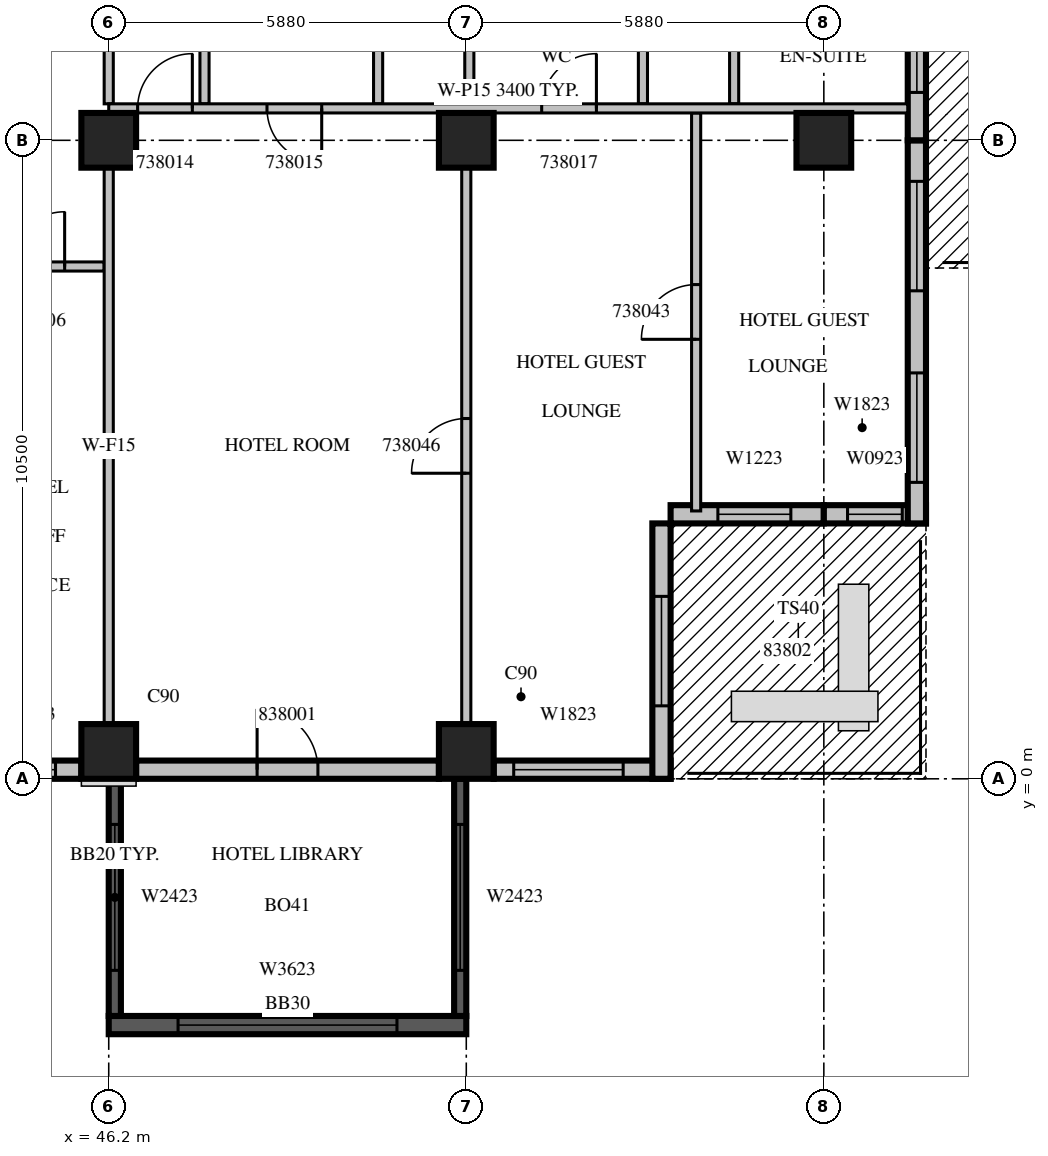
"""IFC4 building model, lengths in metres.
Left out: names, types, materials, properties, quantities, classifications, styles, units other than length and angle.
Written with IfcOpenShell. Run it as: python <this file> out.ifc"""

import sys

from ifc_helpers import new_model, si_unit, direction, frame, frame_2d, origin, origin_2d, place, context, subcontext, project, spatial, rectangle, extrude, source, transform, mapped, element, fill, save


model = new_model("IFC4")
c1 = context("Model", 3, precision=1e-05, world=origin(), true_north=direction((0.0, 1.0)))
c2 = subcontext(c1, "Body", "Model", "MODEL_VIEW")
j1 = project(units=[si_unit("LENGTHUNIT", "METRE"), si_unit("PLANEANGLEUNIT", "RADIAN")], contexts=[c1])
p1 = place(None, origin())
s1 = spatial("IfcSite", under=j1, at=p1, CompositionType="ELEMENT")
p2 = place(p1, origin())
s2 = spatial("IfcBuilding", under=s1, at=p2, CompositionType="ELEMENT")
p3 = place(p2, frame((0.0, 0.0, 177.8)))
s3 = spatial("IfcBuildingStorey", under=s2, at=p3, CompositionType="ELEMENT", Elevation=177.8)
m1 = source(origin(), c2, "Body", "SweptSolid", [
    extrude(rectangle(XDim=0.9, YDim=0.9, at=origin_2d()), origin(), (0.0, 0.0, 1.0), 3.8),
])
for number, where, z_axis, x_axis in (
    (1, (46.2, 0.45, 0.0), (0.0, 0.0, 1.0), (1.0, 0.0, 0.0)),
    (2, (52.08, 0.45, 0.0), (0.0, 0.0, 1.0), (1.0, 0.0, 0.0)),
    (3, (46.2, 10.5, 0.0), (0.0, 0.0, 1.0), (1.0, 0.0, 0.0)),
    (4, (52.08, 10.5, 0.0), (0.0, 0.0, 1.0), (1.0, 0.0, 0.0)),
    (5, (57.96, 10.5, 0.0), (0.0, 0.0, 1.0), (1.0, 0.0, 0.0)),
):
    element("IfcColumn", number, at=place(p3, frame(where, z_axis=z_axis, x_axis=x_axis)), inside=s3, PredefinedType="COLUMN", context=c2, shape_type="MappedRepresentation", body=[
        mapped(m1, transform((0.0, 0.0, 0.0), scale=1.0)),
    ])
p4 = place(p3, frame((44.0, 0.15, 0.0), z_axis=(0.0, 0.0, 1.0), x_axis=(1.0, 0.0, 0.0)))
e6 = element("IfcWall", 6, at=p4, inside=s3, PredefinedType="STANDARD", context=c2, shape_type="SweptSolid", body=[
    extrude(rectangle(XDim=1.75, YDim=0.3, at=frame_2d((0.875, 0.0))), origin(), (0.0, 0.0, 1.0), 3.4),
])
p5 = place(p4, frame((0.425, 0.0, 0.6)))
e7 = element("IfcOpeningElement", 7, at=p5, cuts=e6, PredefinedType="OPENING", context=c2, shape_type="SweptSolid", body=[
    extrude(rectangle(XDim=0.9, YDim=2.3, at=frame_2d((0.45, 1.15))), frame((0.0, 0.16, 0.0), z_axis=(0.0, -1.0, 0.0), x_axis=(1.0, 0.0, 0.0)), (0.0, 0.0, 1.0), 0.32),
])
p6 = place(p3, frame((46.65, 0.15, 0.0), z_axis=(0.0, 0.0, 1.0), x_axis=(1.0, 0.0, 0.0)))
e8 = element("IfcWall", 8, at=p6, inside=s3, PredefinedType="STANDARD", context=c2, shape_type="SweptSolid", body=[
    extrude(rectangle(XDim=4.98, YDim=0.3, at=frame_2d((2.49, 0.0))), origin(), (0.0, 0.0, 1.0), 3.4),
])
m2 = source(origin(), c2, "Body", "SweptSolid", [
    extrude(rectangle(XDim=1.0, YDim=2.1, at=frame_2d((0.5, 1.05))), frame((0.0, 0.16, 0.0), z_axis=(0.0, -1.0, 0.0), x_axis=(1.0, 0.0, 0.0)), (0.0, 0.0, 1.0), 0.32),
])
p7 = place(p6, frame((1.99, 0.0, 0.0)))
e9 = element("IfcOpeningElement", 9, at=p7, cuts=e8, PredefinedType="OPENING", context=c2, shape_type="MappedRepresentation", body=[
    mapped(m2, transform((0.0, 0.0, 0.0), scale=1.0)),
])
p8 = place(p3, frame((52.53, 0.15, 0.0), z_axis=(0.0, 0.0, 1.0), x_axis=(1.0, 0.0, 0.0)))
e10 = element("IfcWall", 10, at=p8, inside=s3, PredefinedType="STANDARD", context=c2, shape_type="SweptSolid", body=[
    extrude(rectangle(XDim=2.91, YDim=0.3, at=frame_2d((1.455, 0.0))), origin(), (0.0, 0.0, 1.0), 3.4),
])
m3 = source(origin(), c2, "Body", "SweptSolid", [
    extrude(rectangle(XDim=1.8, YDim=2.3, at=frame_2d((0.9, 1.15))), frame((0.0, 0.16, 0.0), z_axis=(0.0, -1.0, 0.0), x_axis=(1.0, 0.0, 0.0)), (0.0, 0.0, 1.0), 0.32),
])
p9 = place(p8, frame((0.33, 0.0, 0.6)))
e11 = element("IfcOpeningElement", 11, at=p9, cuts=e10, PredefinedType="OPENING", context=c2, shape_type="MappedRepresentation", body=[
    mapped(m3, transform((0.0, 0.0, 0.0), scale=1.0)),
])
p10 = place(p3, frame((55.29, 0.0, 0.0), z_axis=(0.0, 0.0, 1.0), x_axis=(0.0, 1.0, 0.0)))
e12 = element("IfcWall", 12, at=p10, inside=s3, PredefinedType="STANDARD", context=c2, shape_type="SweptSolid", body=[
    extrude(rectangle(XDim=4.2, YDim=0.3, at=frame_2d((2.1, 0.0))), origin(), (0.0, 0.0, 1.0), 3.4),
])
m4 = source(origin(), c2, "Body", "SweptSolid", [
    extrude(rectangle(XDim=1.8, YDim=2.4, at=frame_2d((0.9, 1.2))), frame((0.0, 0.16, 0.0), z_axis=(0.0, -1.0, 0.0), x_axis=(1.0, 0.0, 0.0)), (0.0, 0.0, 1.0), 0.32),
])
p11 = place(p10, frame((1.2, 0.0, 0.0)))
e13 = element("IfcOpeningElement", 13, at=p11, cuts=e12, PredefinedType="OPENING", context=c2, shape_type="MappedRepresentation", body=[
    mapped(m4, transform((0.0, 0.0, 0.0), scale=1.0)),
])
p12 = place(p3, frame((55.44, 4.35, 0.0), z_axis=(0.0, 0.0, 1.0), x_axis=(1.0, 0.0, 0.0)))
e14 = element("IfcWall", 14, at=p12, inside=s3, PredefinedType="STANDARD", context=c2, shape_type="SweptSolid", body=[
    extrude(rectangle(XDim=2.52, YDim=0.3, at=frame_2d((1.26, 0.0))), origin(), (0.0, 0.0, 1.0), 3.4),
])
m5 = source(origin(), c2, "Body", "SweptSolid", [
    extrude(rectangle(XDim=1.2, YDim=2.3, at=frame_2d((0.6, 1.15))), frame((0.0, 0.16, 0.0), z_axis=(0.0, -1.0, 0.0), x_axis=(1.0, 0.0, 0.0)), (0.0, 0.0, 1.0), 0.32),
])
p13 = place(p12, frame((0.777, 0.0, 0.6)))
e15 = element("IfcOpeningElement", 15, at=p13, cuts=e14, PredefinedType="OPENING", context=c2, shape_type="MappedRepresentation", body=[
    mapped(m5, transform((0.0, 0.0, 0.0), scale=1.0)),
])
p14 = place(p3, frame((57.96, 4.35, 0.0), z_axis=(0.0, 0.0, 1.0), x_axis=(1.0, 0.0, 0.0)))
e16 = element("IfcWall", 16, at=p14, inside=s3, PredefinedType="STANDARD", context=c2, shape_type="SweptSolid", body=[
    extrude(rectangle(XDim=1.68, YDim=0.3, at=frame_2d((0.84, 0.0))), origin(), (0.0, 0.0, 1.0), 3.4),
])
m6 = source(origin(), c2, "Body", "SweptSolid", [
    extrude(rectangle(XDim=0.9, YDim=2.3, at=frame_2d((0.45, 1.15))), frame((0.0, 0.16, 0.0), z_axis=(0.0, -1.0, 0.0), x_axis=(1.0, 0.0, 0.0)), (0.0, 0.0, 1.0), 0.32),
])
p15 = place(p14, frame((0.39, 0.0, 0.6)))
e17 = element("IfcOpeningElement", 17, at=p15, cuts=e16, PredefinedType="OPENING", context=c2, shape_type="MappedRepresentation", body=[
    mapped(m6, transform((0.0, 0.0, 0.0), scale=1.0)),
])
p16 = place(p3, frame((59.49, 4.2, 0.0), z_axis=(0.0, 0.0, 1.0), x_axis=(0.0, 1.0, 0.0)))
e18 = element("IfcWall", 18, at=p16, inside=s3, PredefinedType="STANDARD", context=c2, shape_type="SweptSolid", body=[
    extrude(rectangle(XDim=6.3, YDim=0.3, at=frame_2d((3.15, 0.0))), origin(), (0.0, 0.0, 1.0), 3.4),
])
p17 = place(p16, frame((0.675, 0.0, 0.6)))
e19 = element("IfcOpeningElement", 19, at=p17, cuts=e18, PredefinedType="OPENING", context=c2, shape_type="MappedRepresentation", body=[
    mapped(m3, transform((0.0, 0.0, 0.0), scale=1.0)),
])
p18 = place(p16, frame((3.825, 0.0, 0.0)))
e20 = element("IfcOpeningElement", 20, at=p18, cuts=e18, PredefinedType="OPENING", context=c2, shape_type="MappedRepresentation", body=[
    mapped(m4, transform((0.0, 0.0, 0.0), scale=1.0)),
])
p19 = place(p3, frame((59.49, 10.5, 0.0), z_axis=(0.0, 0.0, 1.0), x_axis=(0.0, 1.0, 0.0)))
e21 = element("IfcWall", 21, at=p19, inside=s3, PredefinedType="STANDARD", context=c2, shape_type="SweptSolid", body=[
    extrude(rectangle(XDim=6.75, YDim=0.3, at=frame_2d((3.375, 0.0))), origin(), (0.0, 0.0, 1.0), 3.4),
])
p20 = place(p19, frame((0.787, 0.0, 0.0)))
e22 = element("IfcOpeningElement", 22, at=p20, cuts=e21, PredefinedType="OPENING", context=c2, shape_type="MappedRepresentation", body=[
    mapped(m4, transform((0.0, 0.0, 0.0), scale=1.0)),
])
p21 = place(p3, frame((46.2, -4.05, 0.0), z_axis=(0.0, 0.0, 1.0), x_axis=(1.0, 0.0, 0.0)))
e23 = element("IfcWall", 23, at=p21, inside=s3, PredefinedType="SOLIDWALL", context=c2, shape_type="SweptSolid", body=[
    extrude(rectangle(XDim=5.88, YDim=0.3, at=frame_2d((2.94, 0.0))), origin(), (0.0, 0.0, 1.0), 3.39),
])
m7 = source(origin(), c2, "Body", "SweptSolid", [
    extrude(rectangle(XDim=3.6, YDim=2.3, at=frame_2d((1.8, 1.15))), frame((0.0, 0.16, 0.0), z_axis=(0.0, -1.0, 0.0), x_axis=(1.0, 0.0, 0.0)), (0.0, 0.0, 1.0), 0.32),
])
p22 = place(p21, frame((1.14, 0.0, 0.6)))
e24 = element("IfcOpeningElement", 24, at=p22, cuts=e23, PredefinedType="OPENING", context=c2, shape_type="MappedRepresentation", body=[
    mapped(m7, transform((0.0, 0.0, 0.0), scale=1.0)),
])
p23 = place(p3, frame((46.3, 0.0, 0.0), z_axis=(0.0, 0.0, 1.0), x_axis=(0.0, -1.0, 0.0)))
e25 = element("IfcWall", 25, at=p23, inside=s3, PredefinedType="SOLIDWALL", context=c2, shape_type="SweptSolid", body=[
    extrude(rectangle(XDim=3.9, YDim=0.2, at=frame_2d((1.95, 0.0))), origin(), (0.0, 0.0, 1.0), 3.39),
])
p24 = place(p23, frame((0.75, 0.0, 0.6)))
e26 = element("IfcOpeningElement", 26, at=p24, cuts=e25, PredefinedType="OPENING", context=c2, shape_type="SweptSolid", body=[
    extrude(rectangle(XDim=2.4, YDim=2.3, at=frame_2d((1.2, 1.15))), frame((0.0, 0.11, 0.0), z_axis=(0.0, -1.0, 0.0), x_axis=(1.0, 0.0, 0.0)), (0.0, 0.0, 1.0), 0.22),
])
m8 = source(origin(), c2, "Body", "SweptSolid", [
    extrude(rectangle(XDim=3.9, YDim=0.2, at=frame_2d((1.95, 0.0))), origin(), (0.0, 0.0, 1.0), 3.39),
])
p25 = place(p3, frame((51.98, 0.0, 0.0), z_axis=(0.0, 0.0, 1.0), x_axis=(0.0, -1.0, 0.0)))
e27 = element("IfcWall", 27, at=p25, inside=s3, PredefinedType="SOLIDWALL", context=c2, shape_type="MappedRepresentation", body=[
    mapped(m8, transform((0.0, 0.0, 0.0), scale=1.0)),
])
m9 = source(origin(), c2, "Body", "SweptSolid", [
    extrude(rectangle(XDim=2.4, YDim=2.3, at=frame_2d((1.2, 1.15))), frame((0.0, 0.11, 0.0), z_axis=(0.0, -1.0, 0.0), x_axis=(1.0, 0.0, 0.0)), (0.0, 0.0, 1.0), 0.22),
])
p26 = place(p25, frame((0.75, 0.0, 0.6)))
e28 = element("IfcOpeningElement", 28, at=p26, cuts=e27, PredefinedType="OPENING", context=c2, shape_type="MappedRepresentation", body=[
    mapped(m9, transform((0.0, 0.0, 0.0), scale=1.0)),
])
p27 = place(p3, frame((46.125, 8.425, 0.0), z_axis=(0.0, 0.0, 1.0), x_axis=(-1.0, 0.0, 0.0)))
e29 = element("IfcWall", 29, at=p27, inside=s3, PredefinedType="PARTITIONING", context=c2, shape_type="SweptSolid", body=[
    extrude(rectangle(XDim=2.2, YDim=0.15, at=frame_2d((1.1, 0.0))), origin(), (0.0, 0.0, 1.0), 3.4),
])
m10 = source(origin(), c2, "Body", "SweptSolid", [
    extrude(rectangle(XDim=0.9, YDim=2.1, at=frame_2d((0.45, 1.05))), frame((0.0, 0.085, 0.0), z_axis=(0.0, -1.0, 0.0), x_axis=(1.0, 0.0, 0.0)), (0.0, 0.0, 1.0), 0.17),
])
p28 = place(p27, frame((0.65, 0.0, 0.0)))
e30 = element("IfcOpeningElement", 30, at=p28, cuts=e29, PredefinedType="OPENING", context=c2, shape_type="MappedRepresentation", body=[
    mapped(m10, transform((0.0, 0.0, 0.0), scale=1.0)),
])
m11 = source(origin(), c2, "Body", "SweptSolid", [
    extrude(rectangle(XDim=9.152, YDim=0.15, at=frame_2d((4.576, 0.0))), origin(), (0.0, 0.0, 1.0), 3.4),
])
p29 = place(p3, frame((52.08, 0.899, 0.0), z_axis=(0.0, 0.0, 1.0), x_axis=(0.0, 1.0, 0.0)))
e31 = element("IfcWall", 31, at=p29, inside=s3, PredefinedType="PARTITIONING", context=c2, shape_type="MappedRepresentation", body=[
    mapped(m11, transform((0.0, 0.0, 0.0), scale=1.0)),
])
p30 = place(p29, frame((4.126, 0.0, 0.0)))
e32 = element("IfcOpeningElement", 32, at=p30, cuts=e31, PredefinedType="OPENING", context=c2, shape_type="MappedRepresentation", body=[
    mapped(m10, transform((0.0, 0.0, 0.0), scale=1.0)),
])
p31 = place(p3, frame((55.86, 4.405, 0.0), z_axis=(0.0, 0.0, 1.0), x_axis=(0.0, 1.0, 0.0)))
e33 = element("IfcWall", 33, at=p31, inside=s3, PredefinedType="PARTITIONING", context=c2, shape_type="SweptSolid", body=[
    extrude(rectangle(XDim=6.545, YDim=0.15, at=frame_2d((3.272, 0.0))), origin(), (0.0, 0.0, 1.0), 3.4),
])
p32 = place(p31, frame((2.822, 0.0, 0.0)))
e34 = element("IfcOpeningElement", 34, at=p32, cuts=e33, PredefinedType="OPENING", context=c2, shape_type="MappedRepresentation", body=[
    mapped(m10, transform((0.0, 0.0, 0.0), scale=1.0)),
])
m12 = source(origin(), c2, "Body", "SweptSolid", [
    extrude(rectangle(XDim=3.9, YDim=0.15, at=frame_2d((1.95, 0.0))), origin(), (0.0, 0.0, 1.0), 3.4),
])
for number, where, z_axis, x_axis in (
    (35, (47.775, 11.1, 0.0), (0.0, 0.0, 1.0), (0.0, 1.0, 0.0)),
    (36, (50.63, 11.1, 0.0), (0.0, 0.0, 1.0), (0.0, 1.0, 0.0)),
    (37, (52.13, 11.1, 0.0), (0.0, 0.0, 1.0), (0.0, 1.0, 0.0)),
    (38, (54.985, 11.1, 0.0), (0.0, 0.0, 1.0), (0.0, 1.0, 0.0)),
):
    element("IfcWall", number, at=place(p3, frame(where, z_axis=z_axis, x_axis=x_axis)), inside=s3, PredefinedType="PARTITIONING", context=c2, shape_type="MappedRepresentation", body=[
        mapped(m12, transform((0.0, 0.0, 0.0), scale=1.0)),
    ])
p33 = place(p3, frame((56.485, 11.1, 0.0), z_axis=(0.0, 0.0, 1.0), x_axis=(0.0, 1.0, 0.0)))
e39 = element("IfcWall", 39, at=p33, inside=s3, PredefinedType="PARTITIONING", context=c2, shape_type="MappedRepresentation", body=[
    mapped(m12, transform((0.0, 0.0, 0.0), scale=1.0)),
])
p34 = place(p33, frame((1.5, 0.0, 0.0)))
e40 = element("IfcOpeningElement", 40, at=p34, cuts=e39, PredefinedType="OPENING", context=c2, shape_type="MappedRepresentation", body=[
    mapped(m10, transform((0.0, 0.0, 0.0), scale=1.0)),
])
p35 = place(p3, frame((46.2, 0.899, 0.0), z_axis=(0.0, 0.0, 1.0), x_axis=(0.0, 1.0, 0.0)))
e41 = element("IfcWall", 41, at=p35, inside=s3, PredefinedType="PARTITIONING", context=c2, shape_type="MappedRepresentation", body=[
    mapped(m11, transform((0.0, 0.0, 0.0), scale=1.0)),
])
p36 = place(p3, frame((46.2, 11.1, 0.0), z_axis=(0.0, 0.0, 1.0), x_axis=(0.0, 1.0, 0.0)))
e42 = element("IfcWall", 42, at=p36, inside=s3, PredefinedType="PARTITIONING", context=c2, shape_type="MappedRepresentation", body=[
    mapped(m12, transform((0.0, 0.0, 0.0), scale=1.0)),
])
p37 = place(p3, frame((59.34, 11.025, 0.0), z_axis=(0.0, 0.0, 1.0), x_axis=(-1.0, 0.0, 0.0)))
e43 = element("IfcWall", 43, at=p37, inside=s3, PredefinedType="PARTITIONING", context=c2, shape_type="SweptSolid", body=[
    extrude(rectangle(XDim=13.14, YDim=0.15, at=frame_2d((6.57, 0.0))), origin(), (0.0, 0.0, 1.0), 3.4),
])
p38 = place(p37, frame((11.765, 0.0, 0.0)))
e44 = element("IfcOpeningElement", 44, at=p38, cuts=e43, PredefinedType="OPENING", context=c2, shape_type="MappedRepresentation", body=[
    mapped(m10, transform((0.0, 0.0, 0.0), scale=1.0)),
])
p39 = place(p37, frame((9.637, 0.0, 0.0)))
e45 = element("IfcOpeningElement", 45, at=p39, cuts=e43, PredefinedType="OPENING", context=c2, shape_type="MappedRepresentation", body=[
    mapped(m10, transform((0.0, 0.0, 0.0), scale=1.0)),
])
p40 = place(p37, frame((5.12, 0.0, 0.0)))
e46 = element("IfcOpeningElement", 46, at=p40, cuts=e43, PredefinedType="OPENING", context=c2, shape_type="MappedRepresentation", body=[
    mapped(m10, transform((0.0, 0.0, 0.0), scale=1.0)),
])
p41 = place(p5, origin())
e47 = element("IfcWindow", 47, at=p41, inside=s3, PartitioningType="SINGLE_PANEL", PredefinedType="WINDOW", context=c2, shape_type="SweptSolid", body=[
    extrude(rectangle(XDim=0.9, YDim=2.3, at=frame_2d((0.45, 1.15))), frame((0.0, 0.03, 0.0), z_axis=(0.0, -1.0, 0.0), x_axis=(1.0, 0.0, 0.0)), (0.0, 0.0, 1.0), 0.06),
])
fill(e7, e47)
m13 = source(origin(), c2, "Body", "SweptSolid", [
    extrude(rectangle(XDim=1.8, YDim=2.3, at=frame_2d((0.9, 1.15))), frame((0.0, 0.03, 0.0), z_axis=(0.0, -1.0, 0.0), x_axis=(1.0, 0.0, 0.0)), (0.0, 0.0, 1.0), 0.06),
])
p42 = place(p9, origin())
e48 = element("IfcWindow", 48, at=p42, inside=s3, PartitioningType="SINGLE_PANEL", PredefinedType="WINDOW", context=c2, shape_type="MappedRepresentation", body=[
    mapped(m13, transform((0.0, 0.0, 0.0), scale=1.0)),
])
fill(e11, e48)
m14 = source(origin(), c2, "Body", "SweptSolid", [
    extrude(rectangle(XDim=1.8, YDim=2.4, at=frame_2d((0.9, 1.2))), frame((0.0, 0.025, 0.0), z_axis=(0.0, -1.0, 0.0), x_axis=(1.0, 0.0, 0.0)), (0.0, 0.0, 1.0), 0.05),
])
p43 = place(p11, origin())
e49 = element("IfcDoor", 49, at=p43, inside=s3, OperationType="SLIDING_TO_LEFT", PredefinedType="DOOR", context=c2, shape_type="MappedRepresentation", body=[
    mapped(m14, transform((0.0, 0.0, 0.0), scale=1.0)),
])
fill(e13, e49)
m15 = source(origin(), c2, "Body", "SweptSolid", [
    extrude(rectangle(XDim=1.2, YDim=2.3, at=frame_2d((0.6, 1.15))), frame((0.0, 0.03, 0.0), z_axis=(0.0, -1.0, 0.0), x_axis=(1.0, 0.0, 0.0)), (0.0, 0.0, 1.0), 0.06),
])
p44 = place(p13, origin())
e50 = element("IfcWindow", 50, at=p44, inside=s3, PartitioningType="SINGLE_PANEL", PredefinedType="WINDOW", context=c2, shape_type="MappedRepresentation", body=[
    mapped(m15, transform((0.0, 0.0, 0.0), scale=1.0)),
])
fill(e15, e50)
m16 = source(origin(), c2, "Body", "SweptSolid", [
    extrude(rectangle(XDim=0.9, YDim=2.3, at=frame_2d((0.45, 1.15))), frame((0.0, 0.03, 0.0), z_axis=(0.0, -1.0, 0.0), x_axis=(1.0, 0.0, 0.0)), (0.0, 0.0, 1.0), 0.06),
])
p45 = place(p15, origin())
e51 = element("IfcWindow", 51, at=p45, inside=s3, PartitioningType="SINGLE_PANEL", PredefinedType="WINDOW", context=c2, shape_type="MappedRepresentation", body=[
    mapped(m16, transform((0.0, 0.0, 0.0), scale=1.0)),
])
fill(e17, e51)
p46 = place(p17, origin())
e52 = element("IfcWindow", 52, at=p46, inside=s3, PartitioningType="SINGLE_PANEL", PredefinedType="WINDOW", context=c2, shape_type="MappedRepresentation", body=[
    mapped(m13, transform((0.0, 0.0, 0.0), scale=1.0)),
])
fill(e19, e52)
p47 = place(p18, origin())
e53 = element("IfcDoor", 53, at=p47, inside=s3, OperationType="SLIDING_TO_LEFT", PredefinedType="DOOR", context=c2, shape_type="MappedRepresentation", body=[
    mapped(m14, transform((0.0, 0.0, 0.0), scale=1.0)),
])
fill(e20, e53)
p48 = place(p20, origin())
e54 = element("IfcDoor", 54, at=p48, inside=s3, OperationType="SLIDING_TO_LEFT", PredefinedType="DOOR", context=c2, shape_type="MappedRepresentation", body=[
    mapped(m14, transform((0.0, 0.0, 0.0), scale=1.0)),
])
fill(e22, e54)
m17 = source(origin(), c2, "Body", "SweptSolid", [
    extrude(rectangle(XDim=3.6, YDim=2.3, at=frame_2d((1.8, 1.15))), frame((0.0, 0.03, 0.0), z_axis=(0.0, -1.0, 0.0), x_axis=(1.0, 0.0, 0.0)), (0.0, 0.0, 1.0), 0.06),
])
p49 = place(p22, origin())
e55 = element("IfcWindow", 55, at=p49, inside=s3, PartitioningType="SINGLE_PANEL", PredefinedType="WINDOW", context=c2, shape_type="MappedRepresentation", body=[
    mapped(m17, transform((0.0, 0.0, 0.0), scale=1.0)),
])
fill(e24, e55)
m18 = source(origin(), c2, "Body", "SweptSolid", [
    extrude(rectangle(XDim=2.4, YDim=2.3, at=frame_2d((1.2, 1.15))), frame((0.0, 0.03, 0.0), z_axis=(0.0, -1.0, 0.0), x_axis=(1.0, 0.0, 0.0)), (0.0, 0.0, 1.0), 0.06),
])
p50 = place(p24, origin())
e56 = element("IfcWindow", 56, at=p50, inside=s3, PartitioningType="SINGLE_PANEL", PredefinedType="WINDOW", context=c2, shape_type="MappedRepresentation", body=[
    mapped(m18, transform((0.0, 0.0, 0.0), scale=1.0)),
])
fill(e26, e56)
p51 = place(p26, origin())
e57 = element("IfcWindow", 57, at=p51, inside=s3, PartitioningType="SINGLE_PANEL", PredefinedType="WINDOW", context=c2, shape_type="MappedRepresentation", body=[
    mapped(m18, transform((0.0, 0.0, 0.0), scale=1.0)),
])
fill(e28, e57)
m19 = source(origin(), c2, "Body", "SweptSolid", [
    extrude(rectangle(XDim=0.9, YDim=2.1, at=frame_2d((0.45, 1.05))), frame((0.0, 0.025, 0.0), z_axis=(0.0, -1.0, 0.0), x_axis=(1.0, 0.0, 0.0)), (0.0, 0.0, 1.0), 0.05),
])
p52 = place(p28, origin())
e58 = element("IfcDoor", 58, at=p52, inside=s3, OperationType="SINGLE_SWING_RIGHT", PredefinedType="DOOR", context=c2, shape_type="MappedRepresentation", body=[
    mapped(m19, transform((0.0, 0.0, 0.0), scale=1.0)),
])
fill(e30, e58)
p53 = place(p38, origin())
e59 = element("IfcDoor", 59, at=p53, inside=s3, OperationType="SINGLE_SWING_RIGHT", PredefinedType="DOOR", context=c2, shape_type="MappedRepresentation", body=[
    mapped(m19, transform((0.0, 0.0, 0.0), scale=1.0)),
])
fill(e44, e59)
p54 = place(p39, origin())
e60 = element("IfcDoor", 60, at=p54, inside=s3, OperationType="SINGLE_SWING_LEFT", PredefinedType="DOOR", context=c2, shape_type="MappedRepresentation", body=[
    mapped(m19, transform((0.0, 0.0, 0.0), scale=1.0)),
])
fill(e45, e60)
p55 = place(p40, origin())
e61 = element("IfcDoor", 61, at=p55, inside=s3, OperationType="SINGLE_SWING_RIGHT", PredefinedType="DOOR", context=c2, shape_type="MappedRepresentation", body=[
    mapped(m19, transform((0.0, 0.0, 0.0), scale=1.0)),
])
fill(e46, e61)
p56 = place(p32, origin())
e62 = element("IfcDoor", 62, at=p56, inside=s3, OperationType="SINGLE_SWING_LEFT", PredefinedType="DOOR", context=c2, shape_type="MappedRepresentation", body=[
    mapped(m19, transform((0.0, 0.0, 0.0), scale=1.0)),
])
fill(e34, e62)
p57 = place(p30, origin())
e63 = element("IfcDoor", 63, at=p57, inside=s3, OperationType="SINGLE_SWING_LEFT", PredefinedType="DOOR", context=c2, shape_type="MappedRepresentation", body=[
    mapped(m19, transform((0.0, 0.0, 0.0), scale=1.0)),
])
fill(e32, e63)
m20 = source(origin(), c2, "Body", "SweptSolid", [
    extrude(rectangle(XDim=1.0, YDim=2.1, at=frame_2d((0.5, 1.05))), frame((0.0, 0.025, 0.0), z_axis=(0.0, -1.0, 0.0), x_axis=(1.0, 0.0, 0.0)), (0.0, 0.0, 1.0), 0.05),
])
p58 = place(p7, origin())
e64 = element("IfcDoor", 64, at=p58, inside=s3, OperationType="SINGLE_SWING_LEFT", PredefinedType="DOOR", context=c2, shape_type="MappedRepresentation", body=[
    mapped(m20, transform((0.0, 0.0, 0.0), scale=1.0)),
])
fill(e9, e64)
save(model, sys.argv[1])
